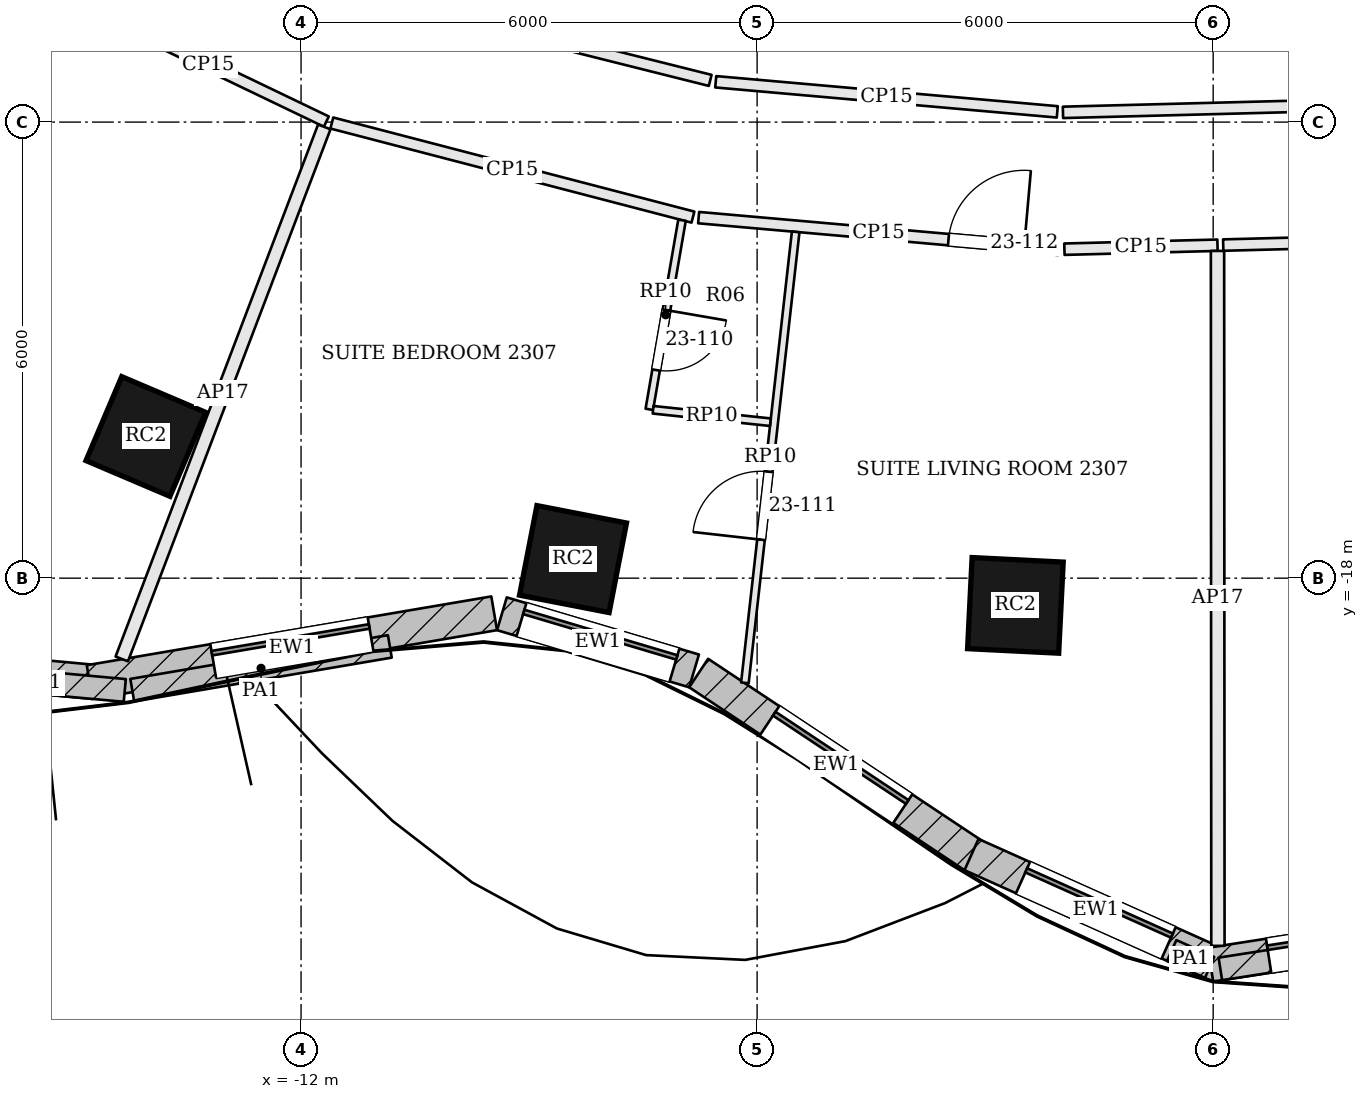
"""IFC4 building model, lengths in metres.
Left out: names, types, materials, properties, quantities, classifications, styles, units other than length and angle.
Written with IfcOpenShell. Run it as: python <this file> out.ifc"""

import sys

from ifc_helpers import new_model, si_unit, direction, frame, frame_2d, origin, origin_2d, place, context, subcontext, project, spatial, rectangle, extrude, element, fill, save


model = new_model("IFC4")
c1 = context("Model", 3, precision=1e-05, world=origin(), true_north=direction((0.0, 1.0)))
c2 = subcontext(c1, "Body", "Model", "MODEL_VIEW")
j1 = project(units=[si_unit("LENGTHUNIT", "METRE"), si_unit("PLANEANGLEUNIT", "RADIAN")], contexts=[c1])
p1 = place(None, origin())
s1 = spatial("IfcSite", under=j1, at=p1, CompositionType="ELEMENT")
p2 = place(p1, origin())
s2 = spatial("IfcBuilding", under=s1, at=p2, CompositionType="ELEMENT")
p3 = place(p2, frame((0.0, 0.0, 99.6)))
s3 = spatial("IfcBuildingStorey", under=s2, at=p3, CompositionType="ELEMENT", Elevation=99.6)
for number, where, z_axis, x_axis in (
    (1, (-14.042, -16.136, 0.0), (0.0, 0.0, 1.0), (0.92, -0.392, 0.0)),
    (2, (-8.422, -17.749, 0.0), (0.0, 0.0, 1.0), (0.982, -0.191, 0.0)),
    (3, (-2.602, -18.358, 0.0), (0.0, 0.0, 1.0), (0.999, -0.05, 0.0)),
):
    element("IfcColumn", number, at=place(p3, frame(where, z_axis=z_axis, x_axis=x_axis)), inside=s3, PredefinedType="COLUMN", context=c2, shape_type="SweptSolid", body=[
        extrude(rectangle(XDim=1.2, YDim=1.2, at=origin_2d()), origin(), (0.0, 0.0, 1.0), 3.6),
    ])
p4 = place(p3, frame((-19.159, -18.956, 0.0), z_axis=(0.0, 0.0, 1.0), x_axis=(0.995777399421, -0.091800712424, 0.0)))
e4 = element("IfcWall", 4, at=p4, inside=s3, PredefinedType="SOLIDWALL", context=c2, shape_type="SweptSolid", body=[
    extrude(rectangle(XDim=4.455, YDim=0.45, at=frame_2d((2.227, 0.0))), origin(), (0.0, 0.0, 1.0), 3.4),
])
p5 = place(p4, frame((1.177, 0.0, 0.9)))
e5 = element("IfcOpeningElement", 5, at=p5, cuts=e4, PredefinedType="OPENING", context=c2, shape_type="SweptSolid", body=[
    extrude(rectangle(XDim=2.1, YDim=2.0, at=frame_2d((1.05, 1.0))), frame((0.0, 0.235, 0.0), z_axis=(0.0, -1.0, 0.0), x_axis=(1.0, 0.0, 0.0)), (0.0, 0.0, 1.0), 0.47),
])
p6 = place(p3, frame((-14.782, -19.367, 0.0), z_axis=(0.0, 0.0, 1.0), x_axis=(0.98585584667, 0.167595493934, 0.0)))
e6 = element("IfcWall", 6, at=p6, inside=s3, PredefinedType="SOLIDWALL", context=c2, shape_type="SweptSolid", body=[
    extrude(rectangle(XDim=5.399, YDim=0.45, at=frame_2d((2.699, 0.0))), origin(), (0.0, 0.0, 1.0), 3.4),
])
p7 = place(p6, frame((1.649, 0.0, 0.9)))
e7 = element("IfcOpeningElement", 7, at=p7, cuts=e6, PredefinedType="OPENING", context=c2, shape_type="SweptSolid", body=[
    extrude(rectangle(XDim=2.1, YDim=2.0, at=frame_2d((1.05, 1.0))), frame((0.0, 0.235, 0.0), z_axis=(0.0, -1.0, 0.0), x_axis=(1.0, 0.0, 0.0)), (0.0, 0.0, 1.0), 0.47),
])
p8 = place(p3, frame((-9.357, -18.469, 0.0), z_axis=(0.0, 0.0, 1.0), x_axis=(0.958524054629, -0.285011643091, 0.0)))
e8 = element("IfcWall", 8, at=p8, inside=s3, PredefinedType="SOLIDWALL", context=c2, shape_type="SweptSolid", body=[
    extrude(rectangle(XDim=2.637, YDim=0.45, at=frame_2d((1.319, 0.0))), origin(), (0.0, 0.0, 1.0), 3.4),
])
p9 = place(p8, frame((0.269, 0.0, 0.9)))
e9 = element("IfcOpeningElement", 9, at=p9, cuts=e8, PredefinedType="OPENING", context=c2, shape_type="SweptSolid", body=[
    extrude(rectangle(XDim=2.1, YDim=2.0, at=frame_2d((1.05, 1.0))), frame((0.0, 0.235, 0.0), z_axis=(0.0, -1.0, 0.0), x_axis=(1.0, 0.0, 0.0)), (0.0, 0.0, 1.0), 0.47),
])
p10 = place(p3, frame((-6.769, -19.248, 0.0), z_axis=(0.0, 0.0, 1.0), x_axis=(0.832973379274, -0.553313066375, 0.0)))
e10 = element("IfcWall", 10, at=p10, inside=s3, PredefinedType="SOLIDWALL", context=c2, shape_type="SweptSolid", body=[
    extrude(rectangle(XDim=4.348, YDim=0.45, at=frame_2d((2.174, 0.0))), origin(), (0.0, 0.0, 1.0), 3.4),
])
p11 = place(p10, frame((1.124, 0.0, 0.9)))
e11 = element("IfcOpeningElement", 11, at=p11, cuts=e10, PredefinedType="OPENING", context=c2, shape_type="SweptSolid", body=[
    extrude(rectangle(XDim=2.1, YDim=2.0, at=frame_2d((1.05, 1.0))), frame((0.0, 0.235, 0.0), z_axis=(0.0, -1.0, 0.0), x_axis=(1.0, 0.0, 0.0)), (0.0, 0.0, 1.0), 0.47),
])
p12 = place(p3, frame((-3.179, -21.636, 0.0), z_axis=(0.0, 0.0, 1.0), x_axis=(0.912608353595, -0.40883492139, 0.0)))
e12 = element("IfcWall", 12, at=p12, inside=s3, PredefinedType="SOLIDWALL", context=c2, shape_type="SweptSolid", body=[
    extrude(rectangle(XDim=3.585, YDim=0.45, at=frame_2d((1.792, 0.0))), origin(), (0.0, 0.0, 1.0), 3.4),
])
p13 = place(p12, frame((0.742, 0.0, 0.9)))
e13 = element("IfcOpeningElement", 13, at=p13, cuts=e12, PredefinedType="OPENING", context=c2, shape_type="SweptSolid", body=[
    extrude(rectangle(XDim=2.1, YDim=2.0, at=frame_2d((1.05, 1.0))), frame((0.0, 0.235, 0.0), z_axis=(0.0, -1.0, 0.0), x_axis=(1.0, 0.0, 0.0)), (0.0, 0.0, 1.0), 0.47),
])
p14 = place(p3, frame((-0.035, -23.085, 0.0), z_axis=(0.0, 0.0, 1.0), x_axis=(0.988133637562, 0.153596596054, 0.0)))
e14 = element("IfcWall", 14, at=p14, inside=s3, PredefinedType="SOLIDWALL", context=c2, shape_type="SweptSolid", body=[
    extrude(rectangle(XDim=3.646, YDim=0.45, at=frame_2d((1.823, 0.0))), origin(), (0.0, 0.0, 1.0), 3.4),
])
p15 = place(p14, frame((0.773, 0.0, 0.9)))
e15 = element("IfcOpeningElement", 15, at=p15, cuts=e14, PredefinedType="OPENING", context=c2, shape_type="SweptSolid", body=[
    extrude(rectangle(XDim=2.1, YDim=2.0, at=frame_2d((1.05, 1.0))), frame((0.0, 0.235, 0.0), z_axis=(0.0, -1.0, 0.0), x_axis=(1.0, 0.0, 0.0)), (0.0, 0.0, 1.0), 0.47),
])
p16 = place(p3, frame((-16.462, -19.28, 3.6), z_axis=(0.0, 0.0, 1.0), x_axis=(0.995778015376, -0.091794030816, 0.0)))
e16 = element("IfcWall", 16, at=p16, inside=s3, PredefinedType="PARAPET", context=c2, shape_type="SweptSolid", body=[
    extrude(rectangle(XDim=2.152, YDim=0.3, at=frame_2d((1.076, 0.0))), origin(), (0.0, 0.0, 1.0), 1.1),
])
p17 = place(p3, frame((-14.221, -19.473, 3.6), z_axis=(0.0, 0.0, 1.0), x_axis=(0.985864880964, 0.167542342353, 0.0)))
e17 = element("IfcWall", 17, at=p17, inside=s3, PredefinedType="PARAPET", context=c2, shape_type="SweptSolid", body=[
    extrude(rectangle(XDim=3.438, YDim=0.3, at=frame_2d((1.719, 0.0))), origin(), (0.0, 0.0, 1.0), 1.1),
])
p18 = place(p3, frame((-0.545, -22.898, 3.6), z_axis=(0.0, 0.0, 1.0), x_axis=(0.912497815069, -0.409081578044, 0.0)))
e18 = element("IfcWall", 18, at=p18, inside=s3, PredefinedType="PARAPET", context=c2, shape_type="SweptSolid", body=[
    extrude(rectangle(XDim=0.546, YDim=0.3, at=frame_2d((0.273, 0.0))), origin(), (0.0, 0.0, 1.0), 1.1),
])
p19 = place(p3, frame((0.094, -23.14, 3.6), z_axis=(0.0, 0.0, 1.0), x_axis=(0.988150084887, 0.153490748056, 0.0)))
e19 = element("IfcWall", 19, at=p19, inside=s3, PredefinedType="PARAPET", context=c2, shape_type="SweptSolid", body=[
    extrude(rectangle(XDim=3.429, YDim=0.3, at=frame_2d((1.715, 0.0))), origin(), (0.0, 0.0, 1.0), 1.1),
])
p20 = place(p3, frame((-14.771, -10.503, 0.0), z_axis=(0.0, 0.0, 1.0), x_axis=(0.901503135339, -0.432772569573, 0.0)))
e20 = element("IfcWall", 20, at=p20, inside=s3, PredefinedType="PARTITIONING", context=c2, shape_type="SweptSolid", body=[
    extrude(rectangle(XDim=3.442, YDim=0.15, at=frame_2d((1.721, 0.0))), origin(), (0.0, 0.0, 1.0), 2.784),
])
p21 = place(p3, frame((-14.359, -19.063, 0.0), z_axis=(0.0, 0.0, 1.0), x_axis=(0.355741824807, 0.934584268048, 0.0)))
e21 = element("IfcWall", 21, at=p21, inside=s3, PredefinedType="PARTITIONING", context=c2, shape_type="SweptSolid", body=[
    extrude(rectangle(XDim=7.49, YDim=0.175, at=frame_2d((3.745, 0.0))), origin(), (0.0, 0.0, 1.0), 2.784),
])
p22 = place(p3, frame((-11.595, -12.012, 0.0), z_axis=(0.0, 0.0, 1.0), x_axis=(0.967696436642, -0.252118239146, 0.0)))
e22 = element("IfcWall", 22, at=p22, inside=s3, PredefinedType="PARTITIONING", context=c2, shape_type="SweptSolid", body=[
    extrude(rectangle(XDim=4.91, YDim=0.15, at=frame_2d((2.455, 0.0))), origin(), (0.0, 0.0, 1.0), 2.784),
])
p23 = place(p3, frame((-6.77, -13.257, 0.0), z_axis=(0.0, 0.0, 1.0), x_axis=(0.996139758015, -0.08778144737, 0.0)))
e23 = element("IfcWall", 23, at=p23, inside=s3, PredefinedType="PARTITIONING", context=c2, shape_type="SweptSolid", body=[
    extrude(rectangle(XDim=4.756, YDim=0.15, at=frame_2d((2.378, 0.0))), origin(), (0.0, 0.0, 1.0), 2.784),
])
p24 = place(p23, frame((3.3, 0.0, 0.0)))
e24 = element("IfcOpeningElement", 24, at=p24, cuts=e23, PredefinedType="OPENING", context=c2, shape_type="SweptSolid", body=[
    extrude(rectangle(XDim=1.0, YDim=2.1, at=frame_2d((0.5, 1.05))), frame((0.0, 0.085, 0.0), z_axis=(0.0, -1.0, 0.0), x_axis=(1.0, 0.0, 0.0)), (0.0, 0.0, 1.0), 0.17),
])
p25 = place(p3, frame((-1.957, -13.672, 0.0), z_axis=(0.0, 0.0, 1.0), x_axis=(0.999663662109, 0.025933813031, 0.0)))
e25 = element("IfcWall", 25, at=p25, inside=s3, PredefinedType="PARTITIONING", context=c2, shape_type="SweptSolid", body=[
    extrude(rectangle(XDim=2.015, YDim=0.15, at=frame_2d((1.007, 0.0))), origin(), (0.0, 0.0, 1.0), 2.784),
])
p26 = place(p3, frame((0.062, -22.837, 0.0), z_axis=(0.0, 0.0, 1.0), x_axis=(-0.000614184887, 0.999999811388, 0.0)))
e26 = element("IfcWall", 26, at=p26, inside=s3, PredefinedType="PARTITIONING", context=c2, shape_type="SweptSolid", body=[
    extrude(rectangle(XDim=9.143, YDim=0.175, at=frame_2d((4.571, 0.0))), origin(), (0.0, 0.0, 1.0), 2.784),
])
p27 = place(p3, frame((0.132, -13.618, 0.0), z_axis=(0.0, 0.0, 1.0), x_axis=(0.999664963682, 0.025883593008, 0.0)))
e27 = element("IfcWall", 27, at=p27, inside=s3, PredefinedType="PARTITIONING", context=c2, shape_type="SweptSolid", body=[
    extrude(rectangle(XDim=4.811, YDim=0.15, at=frame_2d((2.405, 0.0))), origin(), (0.0, 0.0, 1.0), 2.784),
])
p28 = place(p3, frame((4.684, -11.699, 0.0), z_axis=(0.0, 0.0, 1.0), x_axis=(-0.999663438204, -0.025942442425, 0.0)))
e28 = element("IfcWall", 28, at=p28, inside=s3, PredefinedType="PARTITIONING", context=c2, shape_type="SweptSolid", body=[
    extrude(rectangle(XDim=6.663, YDim=0.15, at=frame_2d((3.332, 0.0))), origin(), (0.0, 0.0, 1.0), 2.784),
])
p29 = place(p3, frame((-2.051, -11.865, 0.0), z_axis=(0.0, 0.0, 1.0), x_axis=(-0.996139599493, 0.087783246245, 0.0)))
e29 = element("IfcWall", 29, at=p29, inside=s3, PredefinedType="PARTITIONING", context=c2, shape_type="SweptSolid", body=[
    extrude(rectangle(XDim=4.511, YDim=0.15, at=frame_2d((2.255, 0.0))), origin(), (0.0, 0.0, 1.0), 2.784),
])
p30 = place(p3, frame((-6.617, -11.451, 0.0), z_axis=(0.0, 0.0, 1.0), x_axis=(-0.969987441267, 0.243155020069, 0.0)))
e30 = element("IfcWall", 30, at=p30, inside=s3, PredefinedType="PARTITIONING", context=c2, shape_type="SweptSolid", body=[
    extrude(rectangle(XDim=4.359, YDim=0.15, at=frame_2d((2.179, 0.0))), origin(), (0.0, 0.0, 1.0), 2.784),
])
p31 = place(p3, frame((-6.161, -19.377, 0.0), z_axis=(0.0, 0.0, 1.0), x_axis=(0.111916919639, 0.993717567067, 0.0)))
e31 = element("IfcWall", 31, at=p31, inside=s3, PredefinedType="PARTITIONING", context=c2, shape_type="SweptSolid", body=[
    extrude(rectangle(XDim=5.971, YDim=0.1, at=frame_2d((2.985, 0.0))), origin(), (0.0, 0.0, 1.0), 2.784),
])
p32 = place(p31, frame((1.896, 0.0, 0.0)))
e32 = element("IfcOpeningElement", 32, at=p32, cuts=e31, PredefinedType="OPENING", context=c2, shape_type="SweptSolid", body=[
    extrude(rectangle(XDim=0.9, YDim=2.4, at=frame_2d((0.45, 1.2))), frame((0.0, 0.06, 0.0), z_axis=(0.0, -1.0, 0.0), x_axis=(1.0, 0.0, 0.0)), (0.0, 0.0, 1.0), 0.12),
])
p33 = place(p3, frame((-6.988, -13.291, 0.0), z_axis=(0.0, 0.0, 1.0), x_axis=(-0.170447564411, -0.985366747859, 0.0)))
e33 = element("IfcWall", 33, at=p33, inside=s3, PredefinedType="PARTITIONING", context=c2, shape_type="SweptSolid", body=[
    extrude(rectangle(XDim=2.525, YDim=0.1, at=frame_2d((1.263, 0.0))), origin(), (0.0, 0.0, 1.0), 2.784),
])
p34 = place(p33, frame((1.2, 0.0, 0.0)))
e34 = element("IfcOpeningElement", 34, at=p34, cuts=e33, PredefinedType="OPENING", context=c2, shape_type="SweptSolid", body=[
    extrude(rectangle(XDim=0.8, YDim=2.1, at=frame_2d((0.4, 1.05))), frame((0.0, 0.06, 0.0), z_axis=(0.0, -1.0, 0.0), x_axis=(1.0, 0.0, 0.0)), (0.0, 0.0, 1.0), 0.12),
])
p35 = place(p3, frame((-7.368, -15.784, 0.0), z_axis=(0.0, 0.0, 1.0), x_axis=(0.994412830605, -0.105560988663, 0.0)))
e35 = element("IfcWall", 35, at=p35, inside=s3, PredefinedType="PARTITIONING", context=c2, shape_type="SweptSolid", body=[
    extrude(rectangle(XDim=1.552, YDim=0.1, at=frame_2d((0.776, 0.0))), origin(), (0.0, 0.0, 1.0), 2.784),
])
p36 = place(p7, origin())
e36 = element("IfcWindow", 36, at=p36, inside=s3, PartitioningType="SINGLE_PANEL", PredefinedType="WINDOW", context=c2, shape_type="SweptSolid", body=[
    extrude(rectangle(XDim=2.1, YDim=2.0, at=frame_2d((1.05, 1.0))), frame((0.0, 0.135, 0.0), z_axis=(0.0, -1.0, 0.0), x_axis=(1.0, 0.0, 0.0)), (0.0, 0.0, 1.0), 0.06),
])
fill(e7, e36)
p37 = place(p9, origin())
e37 = element("IfcWindow", 37, at=p37, inside=s3, PartitioningType="SINGLE_PANEL", PredefinedType="WINDOW", context=c2, shape_type="SweptSolid", body=[
    extrude(rectangle(XDim=2.1, YDim=2.0, at=frame_2d((1.05, 1.0))), frame((0.0, 0.135, 0.0), z_axis=(0.0, -1.0, 0.0), x_axis=(1.0, 0.0, 0.0)), (0.0, 0.0, 1.0), 0.06),
])
fill(e9, e37)
p38 = place(p11, origin())
e38 = element("IfcWindow", 38, at=p38, inside=s3, PartitioningType="SINGLE_PANEL", PredefinedType="WINDOW", context=c2, shape_type="SweptSolid", body=[
    extrude(rectangle(XDim=2.1, YDim=2.0, at=frame_2d((1.05, 1.0))), frame((0.0, 0.135, 0.0), z_axis=(0.0, -1.0, 0.0), x_axis=(1.0, 0.0, 0.0)), (0.0, 0.0, 1.0), 0.06),
])
fill(e11, e38)
p39 = place(p13, origin())
e39 = element("IfcWindow", 39, at=p39, inside=s3, PartitioningType="SINGLE_PANEL", PredefinedType="WINDOW", context=c2, shape_type="SweptSolid", body=[
    extrude(rectangle(XDim=2.1, YDim=2.0, at=frame_2d((1.05, 1.0))), frame((0.0, 0.135, 0.0), z_axis=(0.0, -1.0, 0.0), x_axis=(1.0, 0.0, 0.0)), (0.0, 0.0, 1.0), 0.06),
])
fill(e13, e39)
p40 = place(p15, origin())
e40 = element("IfcWindow", 40, at=p40, inside=s3, PartitioningType="SINGLE_PANEL", PredefinedType="WINDOW", context=c2, shape_type="SweptSolid", body=[
    extrude(rectangle(XDim=2.1, YDim=2.0, at=frame_2d((1.05, 1.0))), frame((0.0, 0.135, 0.0), z_axis=(0.0, -1.0, 0.0), x_axis=(1.0, 0.0, 0.0)), (0.0, 0.0, 1.0), 0.06),
])
fill(e15, e40)
p41 = place(p34, origin())
e41 = element("IfcDoor", 41, at=p41, inside=s3, OperationType="SINGLE_SWING_LEFT", PredefinedType="DOOR", context=c2, shape_type="SweptSolid", body=[
    extrude(rectangle(XDim=0.8, YDim=2.1, at=frame_2d((0.4, 1.05))), frame((0.0, 0.025, 0.0), z_axis=(0.0, -1.0, 0.0), x_axis=(1.0, 0.0, 0.0)), (0.0, 0.0, 1.0), 0.05),
])
fill(e34, e41)
p42 = place(p32, origin())
e42 = element("IfcDoor", 42, at=p42, inside=s3, OperationType="SINGLE_SWING_LEFT", PredefinedType="DOOR", context=c2, shape_type="SweptSolid", body=[
    extrude(rectangle(XDim=0.9, YDim=2.4, at=frame_2d((0.45, 1.2))), frame((0.0, 0.025, 0.0), z_axis=(0.0, -1.0, 0.0), x_axis=(1.0, 0.0, 0.0)), (0.0, 0.0, 1.0), 0.05),
])
fill(e32, e42)
p43 = place(p24, origin())
e43 = element("IfcDoor", 43, at=p43, inside=s3, OperationType="SINGLE_SWING_RIGHT", PredefinedType="DOOR", context=c2, shape_type="SweptSolid", body=[
    extrude(rectangle(XDim=1.0, YDim=2.1, at=frame_2d((0.5, 1.05))), frame((0.0, 0.025, 0.0), z_axis=(0.0, -1.0, 0.0), x_axis=(1.0, 0.0, 0.0)), (0.0, 0.0, 1.0), 0.05),
])
fill(e24, e43)
save(model, sys.argv[1])
